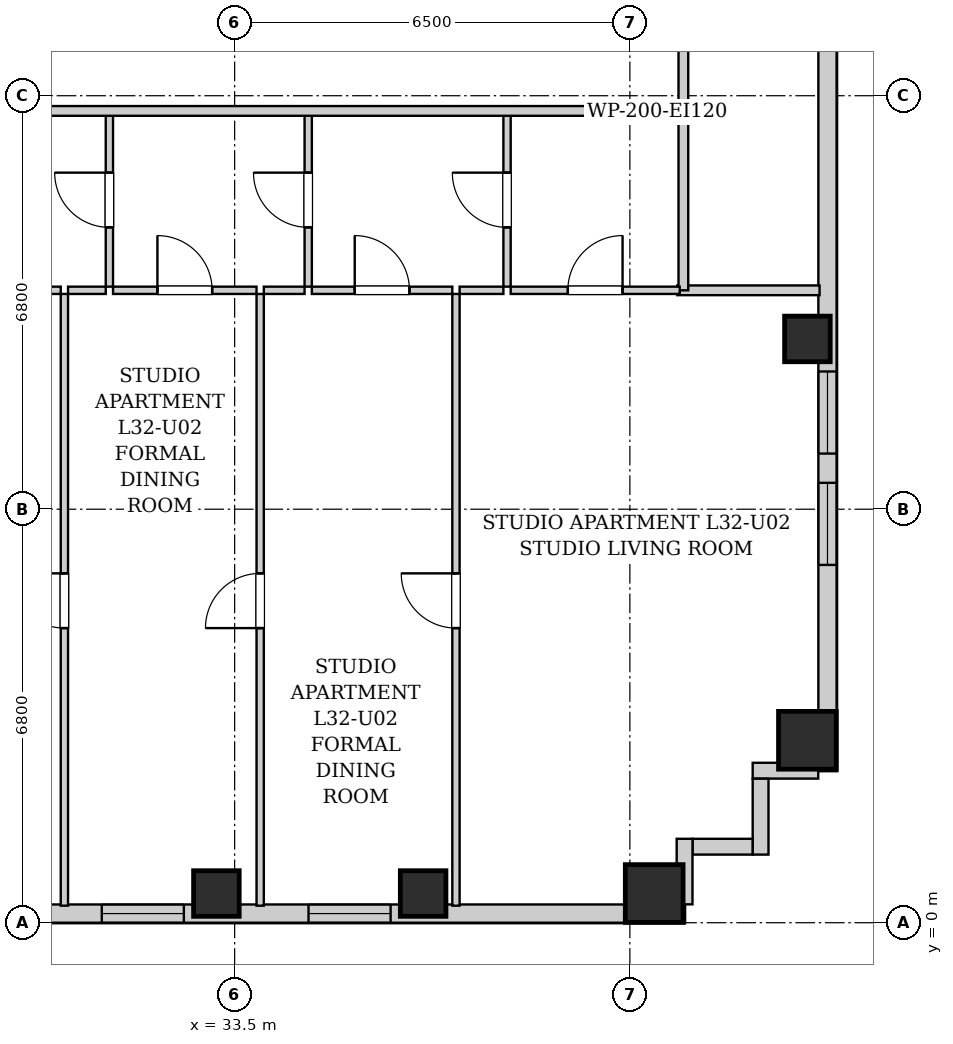
"""IFC4 building model, lengths in metres.
Left out: names, types, materials, properties, quantities, classifications, styles, units other than length and angle.
Written with IfcOpenShell. Run it as: python <this file> out.ifc"""

import sys

from ifc_helpers import new_model, si_unit, direction, frame, frame_2d, origin, origin_2d, place, context, subcontext, project, spatial, rectangle, extrude, element, fill, save


model = new_model("IFC4")
c1 = context("Model", 3, precision=1e-05, world=origin(), true_north=direction((0.0, 1.0)))
c2 = subcontext(c1, "Body", "Model", "MODEL_VIEW")
j1 = project(units=[si_unit("LENGTHUNIT", "METRE"), si_unit("PLANEANGLEUNIT", "RADIAN")], contexts=[c1])
p1 = place(None, origin())
s1 = spatial("IfcSite", under=j1, at=p1, CompositionType="ELEMENT")
p2 = place(p1, origin())
s2 = spatial("IfcBuilding", under=s1, at=p2, CompositionType="ELEMENT")
p3 = place(p2, frame((0.0, 0.0, 113.5)))
s3 = spatial("IfcBuildingStorey", under=s2, at=p3, CompositionType="ELEMENT", Elevation=113.5)
for number, where, z_axis, x_axis in (
    (1, (33.2, 0.48, 0.0), (0.0, 0.0, 1.0), (1.0, 0.0, 0.0)),
    (2, (36.6, 0.48, 0.0), (0.0, 0.0, 1.0), (1.0, 0.0, 0.0)),
):
    element("IfcColumn", number, at=place(p3, frame(where, z_axis=z_axis, x_axis=x_axis)), inside=s3, PredefinedType="COLUMN", context=c2, shape_type="SweptSolid", body=[
        extrude(rectangle(XDim=0.75, YDim=0.75, at=origin_2d()), origin(), (0.0, 0.0, 1.0), 3.2),
    ])
for number, where, z_axis, x_axis in (
    (3, (40.4, 0.48, 0.0), (0.0, 0.0, 1.0), (1.0, 0.0, 0.0)),
    (4, (42.92, 3.0, 0.0), (0.0, 0.0, 1.0), (1.0, 0.0, 0.0)),
):
    element("IfcColumn", number, at=place(p3, frame(where, z_axis=z_axis, x_axis=x_axis)), inside=s3, PredefinedType="COLUMN", context=c2, shape_type="SweptSolid", body=[
        extrude(rectangle(XDim=0.95, YDim=0.95, at=origin_2d()), origin(), (0.0, 0.0, 1.0), 3.2),
    ])
p4 = place(p3, frame((42.92, 9.6, 0.0), z_axis=(0.0, 0.0, 1.0), x_axis=(1.0, 0.0, 0.0)))
e5 = element("IfcColumn", 5, at=p4, inside=s3, PredefinedType="COLUMN", context=c2, shape_type="SweptSolid", body=[
    extrude(rectangle(XDim=0.75, YDim=0.75, at=origin_2d()), origin(), (0.0, 0.0, 1.0), 3.2),
])
p5 = place(p3, frame((43.25, 24.6, 0.0), z_axis=(0.0, 0.0, 1.0), x_axis=(0.0, -1.0, 0.0)))
e6 = element("IfcWall", 6, at=p5, inside=s3, PredefinedType="SOLIDWALL", context=c2, shape_type="SweptSolid", body=[
    extrude(rectangle(XDim=22.1, YDim=0.3, at=frame_2d((11.05, 0.0))), origin(), (0.0, 0.0, 1.0), 2.94),
])
p6 = place(p5, frame((17.366, 0.0, 0.55)))
e7 = element("IfcOpeningElement", 7, at=p6, cuts=e6, PredefinedType="OPENING", context=c2, shape_type="SweptSolid", body=[
    extrude(rectangle(XDim=1.35, YDim=1.2, at=frame_2d((0.675, 0.6))), frame((0.0, 0.16, 0.0), z_axis=(0.0, -1.0, 0.0), x_axis=(1.0, 0.0, 0.0)), (0.0, 0.0, 1.0), 0.32),
])
p7 = place(p5, frame((15.535, 0.0, 0.55)))
e8 = element("IfcOpeningElement", 8, at=p7, cuts=e6, PredefinedType="OPENING", context=c2, shape_type="SweptSolid", body=[
    extrude(rectangle(XDim=1.35, YDim=1.2, at=frame_2d((0.675, 0.6))), frame((0.0, 0.16, 0.0), z_axis=(0.0, -1.0, 0.0), x_axis=(1.0, 0.0, 0.0)), (0.0, 0.0, 1.0), 0.32),
])
p8 = place(p5, frame((5.1, 0.0, 0.55)))
e9 = element("IfcOpeningElement", 9, at=p8, cuts=e6, PredefinedType="OPENING", context=c2, shape_type="SweptSolid", body=[
    extrude(rectangle(XDim=1.35, YDim=1.2, at=frame_2d((0.675, 0.6))), frame((0.0, 0.16, 0.0), z_axis=(0.0, -1.0, 0.0), x_axis=(1.0, 0.0, 0.0)), (0.0, 0.0, 1.0), 0.32),
])
p9 = place(p5, frame((6.71, 0.0, 0.55)))
e10 = element("IfcOpeningElement", 10, at=p9, cuts=e6, PredefinedType="OPENING", context=c2, shape_type="SweptSolid", body=[
    extrude(rectangle(XDim=1.35, YDim=1.2, at=frame_2d((0.675, 0.6))), frame((0.0, 0.16, 0.0), z_axis=(0.0, -1.0, 0.0), x_axis=(1.0, 0.0, 0.0)), (0.0, 0.0, 1.0), 0.32),
])
p10 = place(p3, frame((40.9, 0.15, 0.0), z_axis=(0.0, 0.0, 1.0), x_axis=(-1.0, 0.0, 0.0)))
e11 = element("IfcWall", 11, at=p10, inside=s3, PredefinedType="SOLIDWALL", context=c2, shape_type="SweptSolid", body=[
    extrude(rectangle(XDim=21.95, YDim=0.3, at=frame_2d((10.975, 0.0))), origin(), (0.0, 0.0, 1.0), 2.94),
])
p11 = place(p10, frame((20.08, 0.0, 0.55)))
e12 = element("IfcOpeningElement", 12, at=p11, cuts=e11, PredefinedType="OPENING", context=c2, shape_type="SweptSolid", body=[
    extrude(rectangle(XDim=1.35, YDim=1.2, at=frame_2d((0.675, 0.6))), frame((0.0, 0.16, 0.0), z_axis=(0.0, -1.0, 0.0), x_axis=(1.0, 0.0, 0.0)), (0.0, 0.0, 1.0), 0.32),
])
p12 = place(p10, frame((18.4, 0.0, 0.55)))
e13 = element("IfcOpeningElement", 13, at=p12, cuts=e11, PredefinedType="OPENING", context=c2, shape_type="SweptSolid", body=[
    extrude(rectangle(XDim=0.85, YDim=1.2, at=frame_2d((0.425, 0.6))), frame((0.0, 0.16, 0.0), z_axis=(0.0, -1.0, 0.0), x_axis=(1.0, 0.0, 0.0)), (0.0, 0.0, 1.0), 0.32),
])
p13 = place(p10, frame((11.127, 0.0, 0.55)))
e14 = element("IfcOpeningElement", 14, at=p13, cuts=e11, PredefinedType="OPENING", context=c2, shape_type="SweptSolid", body=[
    extrude(rectangle(XDim=1.35, YDim=1.2, at=frame_2d((0.675, 0.6))), frame((0.0, 0.16, 0.0), z_axis=(0.0, -1.0, 0.0), x_axis=(1.0, 0.0, 0.0)), (0.0, 0.0, 1.0), 0.32),
])
p14 = place(p10, frame((8.235, 0.0, 0.55)))
e15 = element("IfcOpeningElement", 15, at=p14, cuts=e11, PredefinedType="OPENING", context=c2, shape_type="SweptSolid", body=[
    extrude(rectangle(XDim=1.35, YDim=1.2, at=frame_2d((0.675, 0.6))), frame((0.0, 0.16, 0.0), z_axis=(0.0, -1.0, 0.0), x_axis=(1.0, 0.0, 0.0)), (0.0, 0.0, 1.0), 0.32),
])
p15 = place(p10, frame((4.835, 0.0, 0.55)))
e16 = element("IfcOpeningElement", 16, at=p15, cuts=e11, PredefinedType="OPENING", context=c2, shape_type="SweptSolid", body=[
    extrude(rectangle(XDim=1.35, YDim=1.2, at=frame_2d((0.675, 0.6))), frame((0.0, 0.16, 0.0), z_axis=(0.0, -1.0, 0.0), x_axis=(1.0, 0.0, 0.0)), (0.0, 0.0, 1.0), 0.32),
])
p16 = place(p3, frame((43.098, 2.5, 0.0), z_axis=(0.0, 0.0, 1.0), x_axis=(-1.0, 0.0, 0.0)))
e17 = element("IfcWall", 17, at=p16, inside=s3, PredefinedType="SOLIDWALL", context=c2, shape_type="SweptSolid", body=[
    extrude(rectangle(XDim=1.078, YDim=0.26, at=frame_2d((0.539, 0.0))), origin(), (0.0, 0.0, 1.0), 2.94),
])
p17 = place(p3, frame((42.15, 2.368, 0.0), z_axis=(0.0, 0.0, 1.0), x_axis=(0.0, -1.0, 0.0)))
e18 = element("IfcWall", 18, at=p17, inside=s3, PredefinedType="SOLIDWALL", context=c2, shape_type="SweptSolid", body=[
    extrude(rectangle(XDim=1.248, YDim=0.26, at=frame_2d((0.624, 0.0))), origin(), (0.0, 0.0, 1.0), 2.94),
])
p18 = place(p3, frame((42.018, 1.25, 0.0), z_axis=(0.0, 0.0, 1.0), x_axis=(-1.0, 0.0, 0.0)))
e19 = element("IfcWall", 19, at=p18, inside=s3, PredefinedType="SOLIDWALL", context=c2, shape_type="SweptSolid", body=[
    extrude(rectangle(XDim=0.986, YDim=0.26, at=frame_2d((0.493, 0.0))), origin(), (0.0, 0.0, 1.0), 2.94),
])
p19 = place(p3, frame((40.9, 1.38, 0.0), z_axis=(0.0, 0.0, 1.0), x_axis=(0.0, -1.0, 0.0)))
e20 = element("IfcWall", 20, at=p19, inside=s3, PredefinedType="SOLIDWALL", context=c2, shape_type="SweptSolid", body=[
    extrude(rectangle(XDim=1.078, YDim=0.26, at=frame_2d((0.539, 0.0))), origin(), (0.0, 0.0, 1.0), 2.94),
])
p20 = place(p3, frame((40.88, 13.35, 0.0), z_axis=(0.0, 0.0, 1.0), x_axis=(0.0, 1.0, 0.0)))
e21 = element("IfcWall", 21, at=p20, inside=s3, PredefinedType="PARTITIONING", context=c2, shape_type="SweptSolid", body=[
    extrude(rectangle(XDim=1.74, YDim=0.16, at=frame_2d((0.87, 0.0))), origin(), (0.0, 0.0, 1.0), 2.94),
])
p21 = place(p3, frame((40.78, 10.4, 0.0), z_axis=(0.0, 0.0, 1.0), x_axis=(1.0, 0.0, 0.0)))
e22 = element("IfcWall", 22, at=p21, inside=s3, PredefinedType="PARTITIONING", context=c2, shape_type="SweptSolid", body=[
    extrude(rectangle(XDim=2.34, YDim=0.16, at=frame_2d((1.17, 0.0))), origin(), (0.0, 0.0, 1.0), 2.94),
])
p22 = place(p3, frame((40.88, 10.4, 0.0), z_axis=(0.0, 0.0, 1.0), x_axis=(0.0, 1.0, 0.0)))
e23 = element("IfcWall", 23, at=p22, inside=s3, PredefinedType="PARTITIONING", context=c2, shape_type="SweptSolid", body=[
    extrude(rectangle(XDim=2.91, YDim=0.16, at=frame_2d((1.455, 0.0))), origin(), (0.0, 0.0, 1.0), 2.94),
])
p23 = place(p3, frame((31.44, 10.46, 0.0), z_axis=(0.0, 0.0, 1.0), x_axis=(0.0, 1.0, 0.0)))
e24 = element("IfcWall", 24, at=p23, inside=s3, PredefinedType="PARTITIONING", context=c2, shape_type="SweptSolid", body=[
    extrude(rectangle(XDim=2.85, YDim=0.12, at=frame_2d((1.425, 0.0))), origin(), (0.0, 0.0, 1.0), 2.94),
])
p24 = place(p23, frame((0.975, 0.0, 0.0)))
e25 = element("IfcOpeningElement", 25, at=p24, cuts=e24, PredefinedType="OPENING", context=c2, shape_type="SweptSolid", body=[
    extrude(rectangle(XDim=0.9, YDim=2.05, at=frame_2d((0.45, 1.025))), frame((0.0, 0.07, 0.0), z_axis=(0.0, -1.0, 0.0), x_axis=(1.0, 0.0, 0.0)), (0.0, 0.0, 1.0), 0.14),
])
p25 = place(p3, frame((28.23, 10.4, 0.0), z_axis=(0.0, 0.0, 1.0), x_axis=(1.0, 0.0, 0.0)))
e26 = element("IfcWall", 26, at=p25, inside=s3, PredefinedType="PARTITIONING", context=c2, shape_type="SweptSolid", body=[
    extrude(rectangle(XDim=2.41, YDim=0.12, at=frame_2d((1.205, 0.0))), origin(), (0.0, 0.0, 1.0), 2.94),
])
p26 = place(p25, frame((0.755, 0.0, 0.0)))
e27 = element("IfcOpeningElement", 27, at=p26, cuts=e26, PredefinedType="OPENING", context=c2, shape_type="SweptSolid", body=[
    extrude(rectangle(XDim=0.9, YDim=2.05, at=frame_2d((0.45, 1.025))), frame((0.0, 0.07, 0.0), z_axis=(0.0, -1.0, 0.0), x_axis=(1.0, 0.0, 0.0)), (0.0, 0.0, 1.0), 0.14),
])
p27 = place(p3, frame((30.76, 10.4, 0.0), z_axis=(0.0, 0.0, 1.0), x_axis=(1.0, 0.0, 0.0)))
e28 = element("IfcWall", 28, at=p27, inside=s3, PredefinedType="PARTITIONING", context=c2, shape_type="SweptSolid", body=[
    extrude(rectangle(XDim=0.62, YDim=0.12, at=frame_2d((0.31, 0.0))), origin(), (0.0, 0.0, 1.0), 2.94),
])
p28 = place(p3, frame((34.71, 10.46, 0.0), z_axis=(0.0, 0.0, 1.0), x_axis=(0.0, 1.0, 0.0)))
e29 = element("IfcWall", 29, at=p28, inside=s3, PredefinedType="PARTITIONING", context=c2, shape_type="SweptSolid", body=[
    extrude(rectangle(XDim=2.85, YDim=0.12, at=frame_2d((1.425, 0.0))), origin(), (0.0, 0.0, 1.0), 2.94),
])
p29 = place(p28, frame((0.975, 0.0, 0.0)))
e30 = element("IfcOpeningElement", 30, at=p29, cuts=e29, PredefinedType="OPENING", context=c2, shape_type="SweptSolid", body=[
    extrude(rectangle(XDim=0.9, YDim=2.05, at=frame_2d((0.45, 1.025))), frame((0.0, 0.07, 0.0), z_axis=(0.0, -1.0, 0.0), x_axis=(1.0, 0.0, 0.0)), (0.0, 0.0, 1.0), 0.14),
])
p30 = place(p3, frame((31.5, 10.4, 0.0), z_axis=(0.0, 0.0, 1.0), x_axis=(1.0, 0.0, 0.0)))
e31 = element("IfcWall", 31, at=p30, inside=s3, PredefinedType="PARTITIONING", context=c2, shape_type="SweptSolid", body=[
    extrude(rectangle(XDim=2.36, YDim=0.12, at=frame_2d((1.18, 0.0))), origin(), (0.0, 0.0, 1.0), 2.94),
])
p31 = place(p30, frame((0.73, 0.0, 0.0)))
e32 = element("IfcOpeningElement", 32, at=p31, cuts=e31, PredefinedType="OPENING", context=c2, shape_type="SweptSolid", body=[
    extrude(rectangle(XDim=0.9, YDim=2.05, at=frame_2d((0.45, 1.025))), frame((0.0, 0.07, 0.0), z_axis=(0.0, -1.0, 0.0), x_axis=(1.0, 0.0, 0.0)), (0.0, 0.0, 1.0), 0.14),
])
p32 = place(p3, frame((33.98, 10.4, 0.0), z_axis=(0.0, 0.0, 1.0), x_axis=(1.0, 0.0, 0.0)))
e33 = element("IfcWall", 33, at=p32, inside=s3, PredefinedType="PARTITIONING", context=c2, shape_type="SweptSolid", body=[
    extrude(rectangle(XDim=0.67, YDim=0.12, at=frame_2d((0.335, 0.0))), origin(), (0.0, 0.0, 1.0), 2.94),
])
p33 = place(p3, frame((37.98, 10.46, 0.0), z_axis=(0.0, 0.0, 1.0), x_axis=(0.0, 1.0, 0.0)))
e34 = element("IfcWall", 34, at=p33, inside=s3, PredefinedType="PARTITIONING", context=c2, shape_type="SweptSolid", body=[
    extrude(rectangle(XDim=2.85, YDim=0.12, at=frame_2d((1.425, 0.0))), origin(), (0.0, 0.0, 1.0), 2.94),
])
p34 = place(p33, frame((0.975, 0.0, 0.0)))
e35 = element("IfcOpeningElement", 35, at=p34, cuts=e34, PredefinedType="OPENING", context=c2, shape_type="SweptSolid", body=[
    extrude(rectangle(XDim=0.9, YDim=2.05, at=frame_2d((0.45, 1.025))), frame((0.0, 0.07, 0.0), z_axis=(0.0, -1.0, 0.0), x_axis=(1.0, 0.0, 0.0)), (0.0, 0.0, 1.0), 0.14),
])
p35 = place(p3, frame((34.77, 10.4, 0.0), z_axis=(0.0, 0.0, 1.0), x_axis=(1.0, 0.0, 0.0)))
e36 = element("IfcWall", 36, at=p35, inside=s3, PredefinedType="PARTITIONING", context=c2, shape_type="SweptSolid", body=[
    extrude(rectangle(XDim=2.31, YDim=0.12, at=frame_2d((1.155, 0.0))), origin(), (0.0, 0.0, 1.0), 2.94),
])
p36 = place(p35, frame((0.705, 0.0, 0.0)))
e37 = element("IfcOpeningElement", 37, at=p36, cuts=e36, PredefinedType="OPENING", context=c2, shape_type="SweptSolid", body=[
    extrude(rectangle(XDim=0.9, YDim=2.05, at=frame_2d((0.45, 1.025))), frame((0.0, 0.07, 0.0), z_axis=(0.0, -1.0, 0.0), x_axis=(1.0, 0.0, 0.0)), (0.0, 0.0, 1.0), 0.14),
])
p37 = place(p3, frame((37.2, 10.4, 0.0), z_axis=(0.0, 0.0, 1.0), x_axis=(1.0, 0.0, 0.0)))
e38 = element("IfcWall", 38, at=p37, inside=s3, PredefinedType="PARTITIONING", context=c2, shape_type="SweptSolid", body=[
    extrude(rectangle(XDim=0.72, YDim=0.12, at=frame_2d((0.36, 0.0))), origin(), (0.0, 0.0, 1.0), 2.94),
])
p38 = place(p3, frame((38.04, 10.4, 0.0), z_axis=(0.0, 0.0, 1.0), x_axis=(1.0, 0.0, 0.0)))
e39 = element("IfcWall", 39, at=p38, inside=s3, PredefinedType="PARTITIONING", context=c2, shape_type="SweptSolid", body=[
    extrude(rectangle(XDim=2.78, YDim=0.12, at=frame_2d((1.39, 0.0))), origin(), (0.0, 0.0, 1.0), 2.94),
])
p39 = place(p38, frame((0.94, 0.0, 0.0)))
e40 = element("IfcOpeningElement", 40, at=p39, cuts=e39, PredefinedType="OPENING", context=c2, shape_type="SweptSolid", body=[
    extrude(rectangle(XDim=0.9, YDim=2.05, at=frame_2d((0.45, 1.025))), frame((0.0, 0.07, 0.0), z_axis=(0.0, -1.0, 0.0), x_axis=(1.0, 0.0, 0.0)), (0.0, 0.0, 1.0), 0.14),
])
p40 = place(p3, frame((30.7, 0.28, 0.0), z_axis=(0.0, 0.0, 1.0), x_axis=(0.0, 1.0, 0.0)))
e41 = element("IfcWall", 41, at=p40, inside=s3, PredefinedType="PARTITIONING", context=c2, shape_type="SweptSolid", body=[
    extrude(rectangle(XDim=10.06, YDim=0.12, at=frame_2d((5.03, 0.0))), origin(), (0.0, 0.0, 1.0), 2.94),
])
p41 = place(p40, frame((4.565, 0.0, 0.0)))
e42 = element("IfcOpeningElement", 42, at=p41, cuts=e41, PredefinedType="OPENING", context=c2, shape_type="SweptSolid", body=[
    extrude(rectangle(XDim=0.9, YDim=2.05, at=frame_2d((0.45, 1.025))), frame((0.0, 0.07, 0.0), z_axis=(0.0, -1.0, 0.0), x_axis=(1.0, 0.0, 0.0)), (0.0, 0.0, 1.0), 0.14),
])
p42 = place(p3, frame((33.92, 0.28, 0.0), z_axis=(0.0, 0.0, 1.0), x_axis=(0.0, 1.0, 0.0)))
e43 = element("IfcWall", 43, at=p42, inside=s3, PredefinedType="PARTITIONING", context=c2, shape_type="SweptSolid", body=[
    extrude(rectangle(XDim=10.06, YDim=0.12, at=frame_2d((5.03, 0.0))), origin(), (0.0, 0.0, 1.0), 2.94),
])
p43 = place(p42, frame((4.565, 0.0, 0.0)))
e44 = element("IfcOpeningElement", 44, at=p43, cuts=e43, PredefinedType="OPENING", context=c2, shape_type="SweptSolid", body=[
    extrude(rectangle(XDim=0.9, YDim=2.05, at=frame_2d((0.45, 1.025))), frame((0.0, 0.07, 0.0), z_axis=(0.0, -1.0, 0.0), x_axis=(1.0, 0.0, 0.0)), (0.0, 0.0, 1.0), 0.14),
])
p44 = place(p3, frame((37.14, 0.28, 0.0), z_axis=(0.0, 0.0, 1.0), x_axis=(0.0, 1.0, 0.0)))
e45 = element("IfcWall", 45, at=p44, inside=s3, PredefinedType="PARTITIONING", context=c2, shape_type="SweptSolid", body=[
    extrude(rectangle(XDim=10.06, YDim=0.12, at=frame_2d((5.03, 0.0))), origin(), (0.0, 0.0, 1.0), 2.94),
])
p45 = place(p44, frame((4.565, 0.0, 0.0)))
e46 = element("IfcOpeningElement", 46, at=p45, cuts=e45, PredefinedType="OPENING", context=c2, shape_type="SweptSolid", body=[
    extrude(rectangle(XDim=0.9, YDim=2.05, at=frame_2d((0.45, 1.025))), frame((0.0, 0.07, 0.0), z_axis=(0.0, -1.0, 0.0), x_axis=(1.0, 0.0, 0.0)), (0.0, 0.0, 1.0), 0.14),
])
p46 = place(p3, frame((10.05, 13.35, 0.0), z_axis=(0.0, 0.0, 1.0), x_axis=(1.0, 0.0, 0.0)))
e47 = element("IfcWall", 47, at=p46, inside=s3, PredefinedType="PARTITIONING", context=c2, shape_type="SweptSolid", body=[
    extrude(rectangle(XDim=30.8, YDim=0.16, at=frame_2d((15.4, 0.0))), origin(), (0.0, 0.0, 1.0), 2.94),
])
p47 = place(p46, frame((3.692, 0.0, 0.0)))
e48 = element("IfcOpeningElement", 48, at=p47, cuts=e47, PredefinedType="OPENING", context=c2, shape_type="SweptSolid", body=[
    extrude(rectangle(XDim=0.95, YDim=2.1, at=frame_2d((0.475, 1.05))), frame((0.0, 0.09, 0.0), z_axis=(0.0, -1.0, 0.0), x_axis=(1.0, 0.0, 0.0)), (0.0, 0.0, 1.0), 0.18),
])
p48 = place(p46, frame((12.095, 0.0, 0.0)))
e49 = element("IfcOpeningElement", 49, at=p48, cuts=e47, PredefinedType="OPENING", context=c2, shape_type="SweptSolid", body=[
    extrude(rectangle(XDim=0.95, YDim=2.1, at=frame_2d((0.475, 1.05))), frame((0.0, 0.09, 0.0), z_axis=(0.0, -1.0, 0.0), x_axis=(1.0, 0.0, 0.0)), (0.0, 0.0, 1.0), 0.18),
])
p49 = place(p24, origin())
e50 = element("IfcDoor", 50, at=p49, inside=s3, OperationType="SINGLE_SWING_RIGHT", PredefinedType="DOOR", context=c2, shape_type="SweptSolid", body=[
    extrude(rectangle(XDim=0.9, YDim=2.05, at=frame_2d((0.45, 1.025))), frame((0.0, 0.025, 0.0), z_axis=(0.0, -1.0, 0.0), x_axis=(1.0, 0.0, 0.0)), (0.0, 0.0, 1.0), 0.05),
])
fill(e25, e50)
p50 = place(p29, origin())
e51 = element("IfcDoor", 51, at=p50, inside=s3, OperationType="SINGLE_SWING_RIGHT", PredefinedType="DOOR", context=c2, shape_type="SweptSolid", body=[
    extrude(rectangle(XDim=0.9, YDim=2.05, at=frame_2d((0.45, 1.025))), frame((0.0, 0.025, 0.0), z_axis=(0.0, -1.0, 0.0), x_axis=(1.0, 0.0, 0.0)), (0.0, 0.0, 1.0), 0.05),
])
fill(e30, e51)
p51 = place(p31, origin())
e52 = element("IfcDoor", 52, at=p51, inside=s3, OperationType="SINGLE_SWING_LEFT", PredefinedType="DOOR", context=c2, shape_type="SweptSolid", body=[
    extrude(rectangle(XDim=0.9, YDim=2.05, at=frame_2d((0.45, 1.025))), frame((0.0, 0.025, 0.0), z_axis=(0.0, -1.0, 0.0), x_axis=(1.0, 0.0, 0.0)), (0.0, 0.0, 1.0), 0.05),
])
fill(e32, e52)
p52 = place(p34, origin())
e53 = element("IfcDoor", 53, at=p52, inside=s3, OperationType="SINGLE_SWING_RIGHT", PredefinedType="DOOR", context=c2, shape_type="SweptSolid", body=[
    extrude(rectangle(XDim=0.9, YDim=2.05, at=frame_2d((0.45, 1.025))), frame((0.0, 0.025, 0.0), z_axis=(0.0, -1.0, 0.0), x_axis=(1.0, 0.0, 0.0)), (0.0, 0.0, 1.0), 0.05),
])
fill(e35, e53)
p53 = place(p36, origin())
e54 = element("IfcDoor", 54, at=p53, inside=s3, OperationType="SINGLE_SWING_LEFT", PredefinedType="DOOR", context=c2, shape_type="SweptSolid", body=[
    extrude(rectangle(XDim=0.9, YDim=2.05, at=frame_2d((0.45, 1.025))), frame((0.0, 0.025, 0.0), z_axis=(0.0, -1.0, 0.0), x_axis=(1.0, 0.0, 0.0)), (0.0, 0.0, 1.0), 0.05),
])
fill(e37, e54)
p54 = place(p39, origin())
e55 = element("IfcDoor", 55, at=p54, inside=s3, OperationType="SINGLE_SWING_RIGHT", PredefinedType="DOOR", context=c2, shape_type="SweptSolid", body=[
    extrude(rectangle(XDim=0.9, YDim=2.05, at=frame_2d((0.45, 1.025))), frame((0.0, 0.025, 0.0), z_axis=(0.0, -1.0, 0.0), x_axis=(1.0, 0.0, 0.0)), (0.0, 0.0, 1.0), 0.05),
])
fill(e40, e55)
p55 = place(p41, origin())
e56 = element("IfcDoor", 56, at=p55, inside=s3, OperationType="SINGLE_SWING_RIGHT", PredefinedType="DOOR", context=c2, shape_type="SweptSolid", body=[
    extrude(rectangle(XDim=0.9, YDim=2.05, at=frame_2d((0.45, 1.025))), frame((0.0, 0.025, 0.0), z_axis=(0.0, -1.0, 0.0), x_axis=(1.0, 0.0, 0.0)), (0.0, 0.0, 1.0), 0.05),
])
fill(e42, e56)
p56 = place(p43, origin())
e57 = element("IfcDoor", 57, at=p56, inside=s3, OperationType="SINGLE_SWING_LEFT", PredefinedType="DOOR", context=c2, shape_type="SweptSolid", body=[
    extrude(rectangle(XDim=0.9, YDim=2.05, at=frame_2d((0.45, 1.025))), frame((0.0, 0.025, 0.0), z_axis=(0.0, -1.0, 0.0), x_axis=(1.0, 0.0, 0.0)), (0.0, 0.0, 1.0), 0.05),
])
fill(e44, e57)
p57 = place(p45, origin())
e58 = element("IfcDoor", 58, at=p57, inside=s3, OperationType="SINGLE_SWING_RIGHT", PredefinedType="DOOR", context=c2, shape_type="SweptSolid", body=[
    extrude(rectangle(XDim=0.9, YDim=2.05, at=frame_2d((0.45, 1.025))), frame((0.0, 0.025, 0.0), z_axis=(0.0, -1.0, 0.0), x_axis=(1.0, 0.0, 0.0)), (0.0, 0.0, 1.0), 0.05),
])
fill(e46, e58)
p58 = place(p14, origin())
e59 = element("IfcWindow", 59, at=p58, inside=s3, PartitioningType="SINGLE_PANEL", PredefinedType="WINDOW", context=c2, shape_type="SweptSolid", body=[
    extrude(rectangle(XDim=1.35, YDim=1.2, at=frame_2d((0.675, 0.6))), frame((0.0, 0.03, 0.0), z_axis=(0.0, -1.0, 0.0), x_axis=(1.0, 0.0, 0.0)), (0.0, 0.0, 1.0), 0.06),
])
fill(e15, e59)
p59 = place(p15, origin())
e60 = element("IfcWindow", 60, at=p59, inside=s3, PartitioningType="SINGLE_PANEL", PredefinedType="WINDOW", context=c2, shape_type="SweptSolid", body=[
    extrude(rectangle(XDim=1.35, YDim=1.2, at=frame_2d((0.675, 0.6))), frame((0.0, 0.03, 0.0), z_axis=(0.0, -1.0, 0.0), x_axis=(1.0, 0.0, 0.0)), (0.0, 0.0, 1.0), 0.06),
])
fill(e16, e60)
p60 = place(p6, origin())
e61 = element("IfcWindow", 61, at=p60, inside=s3, PartitioningType="SINGLE_PANEL", PredefinedType="WINDOW", context=c2, shape_type="SweptSolid", body=[
    extrude(rectangle(XDim=1.35, YDim=1.2, at=frame_2d((0.675, 0.6))), frame((0.0, 0.03, 0.0), z_axis=(0.0, -1.0, 0.0), x_axis=(1.0, 0.0, 0.0)), (0.0, 0.0, 1.0), 0.06),
])
fill(e7, e61)
p61 = place(p7, origin())
e62 = element("IfcWindow", 62, at=p61, inside=s3, PartitioningType="SINGLE_PANEL", PredefinedType="WINDOW", context=c2, shape_type="SweptSolid", body=[
    extrude(rectangle(XDim=1.35, YDim=1.2, at=frame_2d((0.675, 0.6))), frame((0.0, 0.03, 0.0), z_axis=(0.0, -1.0, 0.0), x_axis=(1.0, 0.0, 0.0)), (0.0, 0.0, 1.0), 0.06),
])
fill(e8, e62)
save(model, sys.argv[1])
